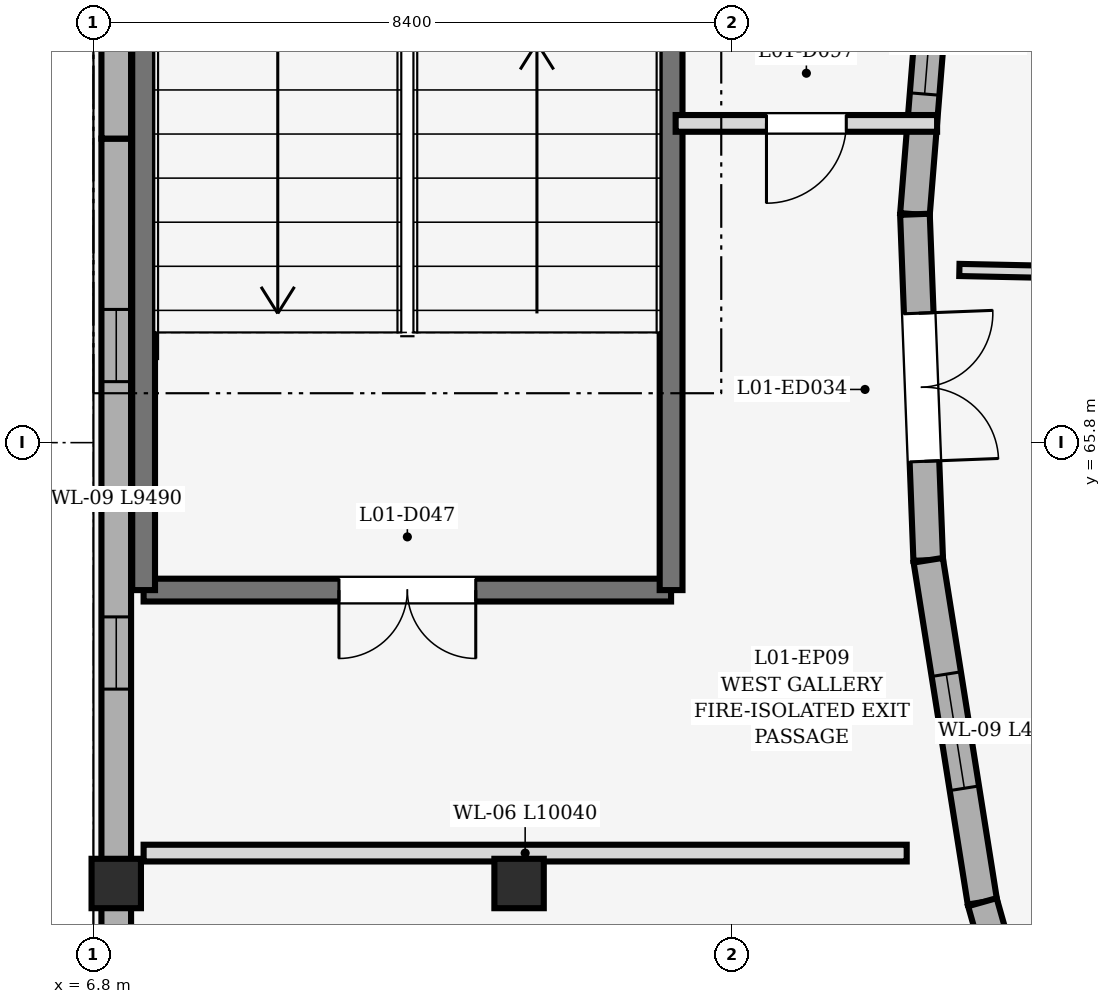
"""IFC4 building model, lengths in metres.
Left out: names, types, materials, properties, quantities, classifications, styles, units other than length and angle.
Written with IfcOpenShell. Run it as: python <this file> out.ifc"""

import sys

from ifc_helpers import new_model, si_unit, direction, frame, frame_2d, origin, origin_2d, place, context, subcontext, project, spatial, rectangle, extrude, element, fill, save


model = new_model("IFC4")
c1 = context("Model", 3, precision=1e-05, world=origin(), true_north=direction((0.0, 1.0)))
c2 = subcontext(c1, "Body", "Model", "MODEL_VIEW")
j1 = project(units=[si_unit("LENGTHUNIT", "METRE"), si_unit("PLANEANGLEUNIT", "RADIAN")], contexts=[c1])
p1 = place(None, origin())
s1 = spatial("IfcSite", under=j1, at=p1, CompositionType="ELEMENT")
p2 = place(p1, origin())
s2 = spatial("IfcBuilding", under=s1, at=p2, CompositionType="ELEMENT")
p3 = place(p2, origin())
s3 = spatial("IfcBuildingStorey", under=s2, at=p3, CompositionType="ELEMENT", Elevation=0.0)
for number, where, z_axis, x_axis in (
    (1, (7.1, 60.0, 0.0), (0.0, 0.0, 1.0), (1.0, 0.0, 0.0)),
    (2, (12.4, 60.0, 0.0), (0.0, 0.0, 1.0), (1.0, 0.0, 0.0)),
):
    element("IfcColumn", number, at=place(p3, frame(where, z_axis=z_axis, x_axis=x_axis)), inside=s3, PredefinedType="COLUMN", context=c2, shape_type="SweptSolid", body=[
        extrude(rectangle(XDim=0.65, YDim=0.65, at=origin_2d()), origin(), (0.0, 0.0, 1.0), 5.4),
    ])
p4 = place(p3, frame((17.974, 73.344, 0.0), z_axis=(0.0, 0.0, 1.0), x_axis=(-0.080188345633, -0.996779729541, 0.0)))
e3 = element("IfcWall", 3, at=p4, inside=s3, PredefinedType="STANDARD", context=c2, shape_type="SweptSolid", body=[
    extrude(rectangle(XDim=4.555, YDim=0.39, at=frame_2d((2.277, 0.0))), origin(), (0.0, 0.0, 1.0), 4.6),
])
p5 = place(p4, frame((1.587, 0.0, 0.85)))
e4 = element("IfcOpeningElement", 4, at=p5, cuts=e3, PredefinedType="OPENING", context=c2, shape_type="SweptSolid", body=[
    extrude(rectangle(XDim=1.38, YDim=1.75, at=frame_2d((0.69, 0.875))), frame((0.0, 0.207, 0.0), z_axis=(0.0, -1.0, 0.0), x_axis=(1.0, 0.0, 0.0)), (0.0, 0.0, 1.0), 0.414),
])
p6 = place(p3, frame((17.608, 68.804, 0.0), z_axis=(0.0, 0.0, 1.0), x_axis=(0.038377542804, -0.999263310749, 0.0)))
e5 = element("IfcWall", 5, at=p6, inside=s3, PredefinedType="STANDARD", context=c2, shape_type="SweptSolid", body=[
    extrude(rectangle(XDim=4.555, YDim=0.39, at=frame_2d((2.277, 0.0))), origin(), (0.0, 0.0, 1.0), 4.6),
])
p7 = place(p6, frame((1.302, 0.0, 0.0)))
e6 = element("IfcOpeningElement", 6, at=p7, cuts=e5, PredefinedType="OPENING", context=c2, shape_type="SweptSolid", body=[
    extrude(rectangle(XDim=1.95, YDim=2.3, at=frame_2d((0.975, 1.15))), frame((0.0, 0.207, 0.0), z_axis=(0.0, -1.0, 0.0), x_axis=(1.0, 0.0, 0.0)), (0.0, 0.0, 1.0), 0.414),
])
p8 = place(p3, frame((17.783, 64.253, 0.0), z_axis=(0.0, 0.0, 1.0), x_axis=(0.156466273676, -0.987683302077, 0.0)))
e7 = element("IfcWall", 7, at=p8, inside=s3, PredefinedType="STANDARD", context=c2, shape_type="SweptSolid", body=[
    extrude(rectangle(XDim=4.555, YDim=0.39, at=frame_2d((2.277, 0.0))), origin(), (0.0, 0.0, 1.0), 4.6),
])
p9 = place(p8, frame((1.517, 0.0, 0.85)))
e8 = element("IfcOpeningElement", 8, at=p9, cuts=e7, PredefinedType="OPENING", context=c2, shape_type="SweptSolid", body=[
    extrude(rectangle(XDim=1.52, YDim=1.75, at=frame_2d((0.76, 0.875))), frame((0.0, 0.207, 0.0), z_axis=(0.0, -1.0, 0.0), x_axis=(1.0, 0.0, 0.0)), (0.0, 0.0, 1.0), 0.414),
])
p10 = place(p3, frame((19.736, 55.372, 0.0), z_axis=(0.0, 0.0, 1.0), x_axis=(-0.272249427892, 0.962226713936, 0.0)))
e9 = element("IfcWall", 9, at=p10, inside=s3, PredefinedType="STANDARD", context=c2, shape_type="SweptSolid", body=[
    extrude(rectangle(XDim=4.555, YDim=0.39, at=frame_2d((2.277, 0.0))), origin(), (0.0, 0.0, 1.0), 4.6),
])
p11 = place(p10, frame((1.417, 0.0, 0.85)))
e10 = element("IfcOpeningElement", 10, at=p11, cuts=e9, PredefinedType="OPENING", context=c2, shape_type="SweptSolid", body=[
    extrude(rectangle(XDim=1.72, YDim=1.75, at=frame_2d((0.86, 0.875))), frame((0.0, 0.207, 0.0), z_axis=(0.0, -1.0, 0.0), x_axis=(1.0, 0.0, 0.0)), (0.0, 0.0, 1.0), 0.414),
])
p12 = place(p3, frame((7.1, 49.81, 0.0), z_axis=(0.0, 0.0, 1.0), x_axis=(0.0, 1.0, 0.0)))
e11 = element("IfcWall", 11, at=p12, inside=s3, PredefinedType="STANDARD", context=c2, shape_type="SweptSolid", body=[
    extrude(rectangle(XDim=9.88, YDim=0.39, at=frame_2d((4.94, 0.0))), origin(), (0.0, 0.0, 1.0), 5.125),
])
p13 = place(p12, frame((2.14, 0.0, 0.0)))
e12 = element("IfcOpeningElement", 12, at=p13, cuts=e11, PredefinedType="OPENING", context=c2, shape_type="SweptSolid", body=[
    extrude(rectangle(XDim=5.6, YDim=4.15, at=frame_2d((2.8, 2.075))), frame((0.0, 0.207, 0.0), z_axis=(0.0, -1.0, 0.0), x_axis=(1.0, 0.0, 0.0)), (0.0, 0.0, 1.0), 0.414),
])
p14 = place(p3, frame((7.1, 60.31, 0.0), z_axis=(0.0, 0.0, 1.0), x_axis=(0.0, 1.0, 0.0)))
e13 = element("IfcWall", 13, at=p14, inside=s3, PredefinedType="STANDARD", context=c2, shape_type="SweptSolid", body=[
    extrude(rectangle(XDim=9.49, YDim=0.39, at=frame_2d((4.745, 0.0))), origin(), (0.0, 0.0, 1.0), 4.6),
])
p15 = place(p14, frame((2.248, 0.0, 0.85)))
e14 = element("IfcOpeningElement", 14, at=p15, cuts=e13, PredefinedType="OPENING", context=c2, shape_type="SweptSolid", body=[
    extrude(rectangle(XDim=0.95, YDim=1.95, at=frame_2d((0.475, 0.975))), frame((0.0, 0.207, 0.0), z_axis=(0.0, -1.0, 0.0), x_axis=(1.0, 0.0, 0.0)), (0.0, 0.0, 1.0), 0.414),
])
p16 = place(p14, frame((6.292, 0.0, 0.85)))
e15 = element("IfcOpeningElement", 15, at=p16, cuts=e13, PredefinedType="OPENING", context=c2, shape_type="SweptSolid", body=[
    extrude(rectangle(XDim=0.95, YDim=1.95, at=frame_2d((0.475, 0.975))), frame((0.0, 0.207, 0.0), z_axis=(0.0, -1.0, 0.0), x_axis=(1.0, 0.0, 0.0)), (0.0, 0.0, 1.0), 0.414),
])
p17 = place(p3, frame((7.1, 69.8, 0.0), z_axis=(0.0, 0.0, 1.0), x_axis=(0.0, 1.0, 0.0)))
e16 = element("IfcWall", 16, at=p17, inside=s3, PredefinedType="STANDARD", context=c2, shape_type="SweptSolid", body=[
    extrude(rectangle(XDim=9.39, YDim=0.39, at=frame_2d((4.695, 0.0))), origin(), (0.0, 0.0, 1.0), 4.6),
])
p18 = place(p17, frame((2.198, 0.0, 0.85)))
e17 = element("IfcOpeningElement", 17, at=p18, cuts=e16, PredefinedType="OPENING", context=c2, shape_type="SweptSolid", body=[
    extrude(rectangle(XDim=1.0, YDim=1.75, at=frame_2d((0.5, 0.875))), frame((0.0, 0.207, 0.0), z_axis=(0.0, -1.0, 0.0), x_axis=(1.0, 0.0, 0.0)), (0.0, 0.0, 1.0), 0.414),
])
p19 = place(p17, frame((6.192, 0.0, 0.85)))
e18 = element("IfcOpeningElement", 18, at=p19, cuts=e16, PredefinedType="OPENING", context=c2, shape_type="SweptSolid", body=[
    extrude(rectangle(XDim=1.0, YDim=1.75, at=frame_2d((0.5, 0.875))), frame((0.0, 0.207, 0.0), z_axis=(0.0, -1.0, 0.0), x_axis=(1.0, 0.0, 0.0)), (0.0, 0.0, 1.0), 0.414),
])
p20 = place(p3, frame((14.4, 63.86, 0.0), z_axis=(0.0, 0.0, 1.0), x_axis=(-1.0, 0.0, 0.0)))
e19 = element("IfcWall", 19, at=p20, inside=s3, PredefinedType="SHEAR", context=c2, shape_type="SweptSolid", body=[
    extrude(rectangle(XDim=6.94, YDim=0.3, at=frame_2d((3.47, 0.0))), origin(), (0.0, 0.0, 1.0), 5.14),
])
p21 = place(p20, frame((2.57, 0.0, 0.0)))
e20 = element("IfcOpeningElement", 20, at=p21, cuts=e19, PredefinedType="OPENING", context=c2, shape_type="SweptSolid", body=[
    extrude(rectangle(XDim=1.8, YDim=2.2, at=frame_2d((0.9, 1.1))), frame((0.0, 0.162, 0.0), z_axis=(0.0, -1.0, 0.0), x_axis=(1.0, 0.0, 0.0)), (0.0, 0.0, 1.0), 0.324),
])
for number, where, z_axis, x_axis in (
    (21, (14.4, 75.34, 0.0), (0.0, 0.0, 1.0), (0.0, -1.0, 0.0)),
    (22, (7.46, 63.86, 0.0), (0.0, 0.0, 1.0), (0.0, 1.0, 0.0)),
):
    element("IfcWall", number, at=place(p3, frame(where, z_axis=z_axis, x_axis=x_axis)), inside=s3, PredefinedType="SHEAR", context=c2, shape_type="SweptSolid", body=[
        extrude(rectangle(XDim=11.48, YDim=0.3, at=frame_2d((5.74, 0.0))), origin(), (0.0, 0.0, 1.0), 5.14),
    ])
p22 = place(p3, frame((7.46, 60.4, 0.0), z_axis=(0.0, 0.0, 1.0), x_axis=(1.0, 0.0, 0.0)))
e23 = element("IfcWall", 23, at=p22, inside=s3, PredefinedType="SOLIDWALL", context=c2, shape_type="SweptSolid", body=[
    extrude(rectangle(XDim=10.04, YDim=0.22, at=frame_2d((5.02, 0.0))), origin(), (0.0, 0.0, 1.0), 4.407),
])
p23 = place(p3, frame((17.9, 70.0, 0.0), z_axis=(0.0, 0.0, 1.0), x_axis=(-1.0, 0.0, 0.0)))
e24 = element("IfcWall", 24, at=p23, inside=s3, PredefinedType="SOLIDWALL", context=c2, shape_type="SweptSolid", body=[
    extrude(rectangle(XDim=3.44, YDim=0.22, at=frame_2d((1.72, 0.0))), origin(), (0.0, 0.0, 1.0), 5.105),
])
p24 = place(p23, frame((1.195, 0.0, 0.0)))
e25 = element("IfcOpeningElement", 25, at=p24, cuts=e24, PredefinedType="OPENING", context=c2, shape_type="SweptSolid", body=[
    extrude(rectangle(XDim=1.05, YDim=2.15, at=frame_2d((0.525, 1.075))), frame((0.0, 0.122, 0.0), z_axis=(0.0, -1.0, 0.0), x_axis=(1.0, 0.0, 0.0)), (0.0, 0.0, 1.0), 0.244),
])
p25 = place(p3, frame((23.842, 67.953, 0.0), z_axis=(0.0, 0.0, 1.0), x_axis=(-0.999780386636, 0.020956586028, 0.0)))
e26 = element("IfcWall", 26, at=p25, inside=s3, PredefinedType="PARTITIONING", context=c2, shape_type="SweptSolid", body=[
    extrude(rectangle(XDim=5.65, YDim=0.16, at=frame_2d((2.825, 0.0))), origin(), (0.0, 0.0, 1.0), 5.105),
])
p26 = place(p5, origin())
e27 = element("IfcWindow", 27, at=p26, inside=s3, PartitioningType="DOUBLE_PANEL_VERTICAL", PredefinedType="WINDOW", context=c2, shape_type="SweptSolid", body=[
    extrude(rectangle(XDim=1.38, YDim=1.75, at=frame_2d((0.69, 0.875))), frame((0.0, 0.03, 0.0), z_axis=(0.0, -1.0, 0.0), x_axis=(1.0, 0.0, 0.0)), (0.0, 0.0, 1.0), 0.06),
])
fill(e4, e27)
p27 = place(p7, origin())
e28 = element("IfcDoor", 28, at=p27, inside=s3, OperationType="DOUBLE_DOOR_SINGLE_SWING", PredefinedType="DOOR", context=c2, shape_type="SweptSolid", body=[
    extrude(rectangle(XDim=1.95, YDim=2.3, at=frame_2d((0.975, 1.15))), frame((0.0, 0.025, 0.0), z_axis=(0.0, -1.0, 0.0), x_axis=(1.0, 0.0, 0.0)), (0.0, 0.0, 1.0), 0.05),
])
fill(e6, e28)
p28 = place(p9, origin())
e29 = element("IfcWindow", 29, at=p28, inside=s3, PartitioningType="DOUBLE_PANEL_VERTICAL", PredefinedType="WINDOW", context=c2, shape_type="SweptSolid", body=[
    extrude(rectangle(XDim=1.52, YDim=1.75, at=frame_2d((0.76, 0.875))), frame((0.0, 0.03, 0.0), z_axis=(0.0, -1.0, 0.0), x_axis=(1.0, 0.0, 0.0)), (0.0, 0.0, 1.0), 0.06),
])
fill(e8, e29)
p29 = place(p15, origin())
e30 = element("IfcWindow", 30, at=p29, inside=s3, PartitioningType="DOUBLE_PANEL_VERTICAL", PredefinedType="WINDOW", context=c2, shape_type="SweptSolid", body=[
    extrude(rectangle(XDim=0.95, YDim=1.95, at=frame_2d((0.475, 0.975))), frame((0.0, 0.03, 0.0), z_axis=(0.0, -1.0, 0.0), x_axis=(1.0, 0.0, 0.0)), (0.0, 0.0, 1.0), 0.06),
])
fill(e14, e30)
p30 = place(p16, origin())
e31 = element("IfcWindow", 31, at=p30, inside=s3, PartitioningType="DOUBLE_PANEL_VERTICAL", PredefinedType="WINDOW", context=c2, shape_type="SweptSolid", body=[
    extrude(rectangle(XDim=0.95, YDim=1.95, at=frame_2d((0.475, 0.975))), frame((0.0, 0.03, 0.0), z_axis=(0.0, -1.0, 0.0), x_axis=(1.0, 0.0, 0.0)), (0.0, 0.0, 1.0), 0.06),
])
fill(e15, e31)
p31 = place(p21, origin())
e32 = element("IfcDoor", 32, at=p31, inside=s3, OperationType="DOUBLE_DOOR_SINGLE_SWING", PredefinedType="DOOR", context=c2, shape_type="SweptSolid", body=[
    extrude(rectangle(XDim=1.8, YDim=2.2, at=frame_2d((0.9, 1.1))), frame((0.0, 0.025, 0.0), z_axis=(0.0, -1.0, 0.0), x_axis=(1.0, 0.0, 0.0)), (0.0, 0.0, 1.0), 0.05),
])
fill(e20, e32)
p32 = place(p24, origin())
e33 = element("IfcDoor", 33, at=p32, inside=s3, OperationType="SINGLE_SWING_RIGHT", PredefinedType="DOOR", context=c2, shape_type="SweptSolid", body=[
    extrude(rectangle(XDim=1.05, YDim=2.15, at=frame_2d((0.525, 1.075))), frame((0.0, 0.025, 0.0), z_axis=(0.0, -1.0, 0.0), x_axis=(1.0, 0.0, 0.0)), (0.0, 0.0, 1.0), 0.05),
])
fill(e25, e33)
save(model, sys.argv[1])
